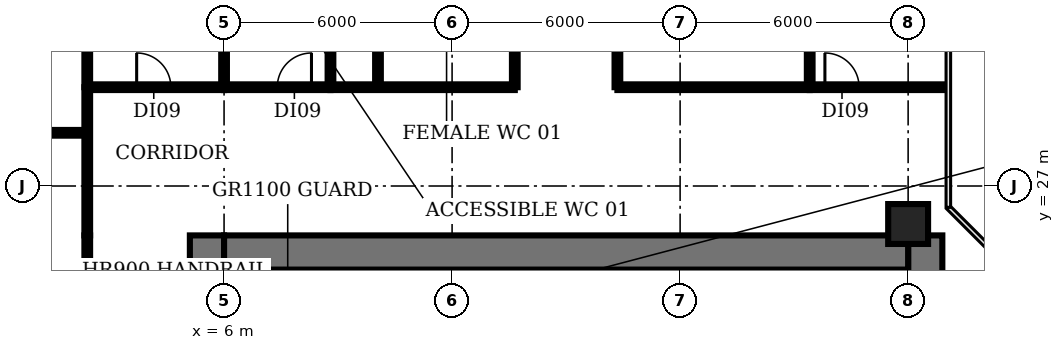
"""IFC4 building model, lengths in metres.
Left out: names, types, materials, properties, quantities, classifications, styles, units other than length and angle.
Written with IfcOpenShell. Run it as: python <this file> out.ifc"""

import sys

from ifc_helpers import new_model, si_unit, direction, frame, frame_2d, origin, origin_2d, place, context, subcontext, project, spatial, rectangle, circle, extrude, element, fill, save


model = new_model("IFC4")
c1 = context("Model", 3, precision=1e-05, world=origin(), true_north=direction((0.0, 1.0)))
c2 = subcontext(c1, "Body", "Model", "MODEL_VIEW")
j1 = project(units=[si_unit("LENGTHUNIT", "METRE"), si_unit("PLANEANGLEUNIT", "RADIAN")], contexts=[c1])
p1 = place(None, origin())
s1 = spatial("IfcSite", under=j1, at=p1, CompositionType="ELEMENT")
p2 = place(p1, origin())
s2 = spatial("IfcBuilding", under=s1, at=p2, CompositionType="ELEMENT")
p3 = place(p2, frame((0.0, 0.0, 71.0)))
s3 = spatial("IfcBuildingStorey", under=s2, at=p3, CompositionType="ELEMENT", Elevation=71.0)
p4 = place(p3, frame((24.0, 26.0, 0.0), z_axis=(0.0, 0.0, 1.0), x_axis=(1.0, 0.0, 0.0)))
e1 = element("IfcColumn", 1, at=p4, inside=s3, PredefinedType="COLUMN", context=c2, shape_type="SweptSolid", body=[
    extrude(circle(Radius=0.525, at=origin_2d()), origin(), (0.0, 0.0, 1.0), 3.85),
])
p5 = place(p3, frame((9.275, 18.375, 0.0), z_axis=(0.0, 0.0, 1.0), x_axis=(0.0, 1.0, 0.0)))
e2 = element("IfcWall", 2, at=p5, inside=s3, PredefinedType="SHEAR", context=c2, shape_type="SweptSolid", body=[
    extrude(rectangle(XDim=6.425, YDim=0.25, at=frame_2d((3.212, 0.0))), origin(), (0.0, 0.0, 1.0), 3.85),
])
for number, where, z_axis, x_axis in (
    (3, (15.1, 22.9, 0.0), (0.0, 0.0, 1.0), (0.0, 1.0, 0.0)),
    (4, (20.7, 22.9, 0.0), (0.0, 0.0, 1.0), (0.0, 1.0, 0.0)),
):
    element("IfcWall", number, at=place(p3, frame(where, z_axis=z_axis, x_axis=x_axis)), inside=s3, PredefinedType="SHEAR", context=c2, shape_type="SweptSolid", body=[
        extrude(rectangle(XDim=1.9, YDim=0.2, at=frame_2d((0.95, 0.0))), origin(), (0.0, 0.0, 1.0), 3.85),
    ])
p6 = place(p3, frame((5.55, 4.5, 0.0), z_axis=(0.0, 0.0, 1.0), x_axis=(0.0, 1.0, 0.0)))
e5 = element("IfcWall", 5, at=p6, inside=s3, PredefinedType="SHEAR", context=c2, shape_type="SweptSolid", body=[
    extrude(rectangle(XDim=21.2, YDim=0.9, at=frame_2d((10.6, 0.0))), origin(), (0.0, 0.0, 1.0), 3.85),
])
p7 = place(p6, frame((1.15, 0.0, 0.0)))
e6 = element("IfcOpeningElement", 6, at=p7, cuts=e5, PredefinedType="OPENING", context=c2, shape_type="SweptSolid", body=[
    extrude(rectangle(XDim=1.5, YDim=2.1, at=frame_2d((0.75, 1.05))), frame((0.0, 0.46, 0.0), z_axis=(0.0, -1.0, 0.0), x_axis=(1.0, 0.0, 0.0)), (0.0, 0.0, 1.0), 0.92),
])
p8 = place(p6, frame((7.6, 0.0, 0.0)))
e7 = element("IfcOpeningElement", 7, at=p8, cuts=e5, PredefinedType="OPENING", context=c2, shape_type="SweptSolid", body=[
    extrude(rectangle(XDim=1.2, YDim=2.1, at=frame_2d((0.6, 1.05))), frame((0.0, 0.46, 0.0), z_axis=(0.0, -1.0, 0.0), x_axis=(1.0, 0.0, 0.0)), (0.0, 0.0, 1.0), 0.92),
])
p9 = place(p6, frame((14.15, 0.0, 0.0)))
e8 = element("IfcOpeningElement", 8, at=p9, cuts=e5, PredefinedType="OPENING", context=c2, shape_type="SweptSolid", body=[
    extrude(rectangle(XDim=1.2, YDim=2.1, at=frame_2d((0.6, 1.05))), frame((0.0, 0.46, 0.0), z_axis=(0.0, -1.0, 0.0), x_axis=(1.0, 0.0, 0.0)), (0.0, 0.0, 1.0), 0.92),
])
p10 = place(p3, frame((24.45, 25.7, 0.0), z_axis=(0.0, 0.0, 1.0), x_axis=(0.0, -1.0, 0.0)))
e9 = element("IfcWall", 9, at=p10, inside=s3, PredefinedType="SHEAR", context=c2, shape_type="SweptSolid", body=[
    extrude(rectangle(XDim=21.2, YDim=0.9, at=frame_2d((10.6, 0.0))), origin(), (0.0, 0.0, 1.0), 3.85),
])
p11 = place(p10, frame((18.55, 0.0, 0.0)))
e10 = element("IfcOpeningElement", 10, at=p11, cuts=e9, PredefinedType="OPENING", context=c2, shape_type="SweptSolid", body=[
    extrude(rectangle(XDim=1.5, YDim=2.1, at=frame_2d((0.75, 1.05))), frame((0.0, 0.46, 0.0), z_axis=(0.0, -1.0, 0.0), x_axis=(1.0, 0.0, 0.0)), (0.0, 0.0, 1.0), 0.92),
])
p12 = place(p10, frame((12.45, 0.0, 0.0)))
e11 = element("IfcOpeningElement", 11, at=p12, cuts=e9, PredefinedType="OPENING", context=c2, shape_type="SweptSolid", body=[
    extrude(rectangle(XDim=0.9, YDim=2.1, at=frame_2d((0.45, 1.05))), frame((0.0, 0.46, 0.0), z_axis=(0.0, -1.0, 0.0), x_axis=(1.0, 0.0, 0.0)), (0.0, 0.0, 1.0), 0.92),
])
p13 = place(p10, frame((6.45, 0.0, 0.0)))
e12 = element("IfcOpeningElement", 12, at=p13, cuts=e9, PredefinedType="OPENING", context=c2, shape_type="SweptSolid", body=[
    extrude(rectangle(XDim=2.0, YDim=2.1, at=frame_2d((1.0, 1.05))), frame((0.0, 0.46, 0.0), z_axis=(0.0, -1.0, 0.0), x_axis=(1.0, 0.0, 0.0)), (0.0, 0.0, 1.0), 0.92),
])
p14 = place(p3, frame((6.0, 25.25, 0.0), z_axis=(0.0, 0.0, 1.0), x_axis=(1.0, 0.0, 0.0)))
e13 = element("IfcWall", 13, at=p14, inside=s3, PredefinedType="SHEAR", context=c2, shape_type="SweptSolid", body=[
    extrude(rectangle(XDim=18.0, YDim=0.9, at=frame_2d((9.0, 0.0))), origin(), (0.0, 0.0, 1.0), 3.85),
])
p15 = place(p3, frame((-1.42, 28.4, 0.0), z_axis=(0.0, 0.0, 1.0), x_axis=(1.0, 0.0, 0.0)))
e14 = element("IfcWall", 14, at=p15, inside=s3, PredefinedType="PARTITIONING", context=c2, shape_type="SweptSolid", body=[
    extrude(rectangle(XDim=3.82, YDim=0.15, at=frame_2d((1.91, 0.0))), origin(), (0.0, 0.0, 1.0), 2.83),
])
p16 = place(p3, frame((2.4, 4.5, 0.0), z_axis=(0.0, 0.0, 1.0), x_axis=(0.0, 1.0, 0.0)))
e15 = element("IfcWall", 15, at=p16, inside=s3, PredefinedType="PARTITIONING", context=c2, shape_type="SweptSolid", body=[
    extrude(rectangle(XDim=21.2, YDim=0.15, at=frame_2d((10.6, 0.0))), origin(), (0.0, 0.0, 1.0), 2.83),
])
p17 = place(p16, frame((10.8, 0.0, 0.0)))
e16 = element("IfcOpeningElement", 16, at=p17, cuts=e15, PredefinedType="OPENING", context=c2, shape_type="SweptSolid", body=[
    extrude(rectangle(XDim=1.2, YDim=2.1, at=frame_2d((0.6, 1.05))), frame((0.0, 0.085, 0.0), z_axis=(0.0, -1.0, 0.0), x_axis=(1.0, 0.0, 0.0)), (0.0, 0.0, 1.0), 0.17),
])
p18 = place(p3, frame((2.4, 25.7, 0.0), z_axis=(0.0, 0.0, 1.0), x_axis=(0.0, 1.0, 0.0)))
e17 = element("IfcWall", 17, at=p18, inside=s3, PredefinedType="PARTITIONING", context=c2, shape_type="SweptSolid", body=[
    extrude(rectangle(XDim=3.9, YDim=0.15, at=frame_2d((1.95, 0.0))), origin(), (0.0, 0.0, 1.0), 2.83),
])
p19 = place(p3, frame((2.4, 29.6, 0.0), z_axis=(0.0, 0.0, 1.0), x_axis=(0.0, 1.0, 0.0)))
e18 = element("IfcWall", 18, at=p19, inside=s3, PredefinedType="PARTITIONING", context=c2, shape_type="SweptSolid", body=[
    extrude(rectangle(XDim=4.8, YDim=0.15, at=frame_2d((2.4, 0.0))), origin(), (0.0, 0.0, 1.0), 2.83),
])
p20 = place(p3, frame((2.4, 29.6, 0.0), z_axis=(0.0, 0.0, 1.0), x_axis=(1.0, 0.0, 0.0)))
e19 = element("IfcWall", 19, at=p20, inside=s3, PredefinedType="PARTITIONING", context=c2, shape_type="SweptSolid", body=[
    extrude(rectangle(XDim=3.6, YDim=0.15, at=frame_2d((1.8, 0.0))), origin(), (0.0, 0.0, 1.0), 2.83),
])
p21 = place(p20, frame((1.3, 0.0, 0.0)))
e20 = element("IfcOpeningElement", 20, at=p21, cuts=e19, PredefinedType="OPENING", context=c2, shape_type="SweptSolid", body=[
    extrude(rectangle(XDim=0.9, YDim=2.1, at=frame_2d((0.45, 1.05))), frame((0.0, 0.085, 0.0), z_axis=(0.0, -1.0, 0.0), x_axis=(1.0, 0.0, 0.0)), (0.0, 0.0, 1.0), 0.17),
])
p22 = place(p3, frame((6.0, 29.6, 0.0), z_axis=(0.0, 0.0, 1.0), x_axis=(0.0, 1.0, 0.0)))
e21 = element("IfcWall", 21, at=p22, inside=s3, PredefinedType="PARTITIONING", context=c2, shape_type="SweptSolid", body=[
    extrude(rectangle(XDim=4.8, YDim=0.15, at=frame_2d((2.4, 0.0))), origin(), (0.0, 0.0, 1.0), 2.83),
])
p23 = place(p3, frame((6.0, 29.6, 0.0), z_axis=(0.0, 0.0, 1.0), x_axis=(1.0, 0.0, 0.0)))
e22 = element("IfcWall", 22, at=p23, inside=s3, PredefinedType="PARTITIONING", context=c2, shape_type="SweptSolid", body=[
    extrude(rectangle(XDim=2.8, YDim=0.15, at=frame_2d((1.4, 0.0))), origin(), (0.0, 0.0, 1.0), 2.83),
])
p24 = place(p23, frame((1.4, 0.0, 0.0)))
e23 = element("IfcOpeningElement", 23, at=p24, cuts=e22, PredefinedType="OPENING", context=c2, shape_type="SweptSolid", body=[
    extrude(rectangle(XDim=0.9, YDim=2.1, at=frame_2d((0.45, 1.05))), frame((0.0, 0.085, 0.0), z_axis=(0.0, -1.0, 0.0), x_axis=(1.0, 0.0, 0.0)), (0.0, 0.0, 1.0), 0.17),
])
p25 = place(p3, frame((8.8, 29.6, 0.0), z_axis=(0.0, 0.0, 1.0), x_axis=(0.0, 1.0, 0.0)))
e24 = element("IfcWall", 24, at=p25, inside=s3, PredefinedType="PARTITIONING", context=c2, shape_type="SweptSolid", body=[
    extrude(rectangle(XDim=4.8, YDim=0.15, at=frame_2d((2.4, 0.0))), origin(), (0.0, 0.0, 1.0), 2.83),
])
p26 = place(p3, frame((8.8, 29.6, 0.0), z_axis=(0.0, 0.0, 1.0), x_axis=(1.0, 0.0, 0.0)))
e25 = element("IfcWall", 25, at=p26, inside=s3, PredefinedType="PARTITIONING", context=c2, shape_type="SweptSolid", body=[
    extrude(rectangle(XDim=4.85, YDim=0.15, at=frame_2d((2.425, 0.0))), origin(), (0.0, 0.0, 1.0), 2.83),
])
p27 = place(p3, frame((10.05, 29.6, 0.0), z_axis=(0.0, 0.0, 1.0), x_axis=(0.0, 1.0, 0.0)))
e26 = element("IfcWall", 26, at=p27, inside=s3, PredefinedType="PARTITIONING", context=c2, shape_type="SweptSolid", body=[
    extrude(rectangle(XDim=4.8, YDim=0.15, at=frame_2d((2.4, 0.0))), origin(), (0.0, 0.0, 1.0), 2.83),
])
p28 = place(p3, frame((13.65, 29.6, 0.0), z_axis=(0.0, 0.0, 1.0), x_axis=(0.0, 1.0, 0.0)))
e27 = element("IfcWall", 27, at=p28, inside=s3, PredefinedType="PARTITIONING", context=c2, shape_type="SweptSolid", body=[
    extrude(rectangle(XDim=4.8, YDim=0.15, at=frame_2d((2.4, 0.0))), origin(), (0.0, 0.0, 1.0), 2.83),
])
p29 = place(p28, frame((1.9, 0.0, 0.0)))
e28 = element("IfcOpeningElement", 28, at=p29, cuts=e27, PredefinedType="OPENING", context=c2, shape_type="SweptSolid", body=[
    extrude(rectangle(XDim=0.9, YDim=2.1, at=frame_2d((0.45, 1.05))), frame((0.0, 0.085, 0.0), z_axis=(0.0, -1.0, 0.0), x_axis=(1.0, 0.0, 0.0)), (0.0, 0.0, 1.0), 0.17),
])
p30 = place(p3, frame((16.35, 29.6, 0.0), z_axis=(0.0, 0.0, 1.0), x_axis=(0.0, 1.0, 0.0)))
e29 = element("IfcWall", 29, at=p30, inside=s3, PredefinedType="PARTITIONING", context=c2, shape_type="SweptSolid", body=[
    extrude(rectangle(XDim=4.8, YDim=0.15, at=frame_2d((2.4, 0.0))), origin(), (0.0, 0.0, 1.0), 2.83),
])
p31 = place(p3, frame((16.35, 29.6, 0.0), z_axis=(0.0, 0.0, 1.0), x_axis=(1.0, 0.0, 0.0)))
e30 = element("IfcWall", 30, at=p31, inside=s3, PredefinedType="PARTITIONING", context=c2, shape_type="SweptSolid", body=[
    extrude(rectangle(XDim=5.06, YDim=0.15, at=frame_2d((2.53, 0.0))), origin(), (0.0, 0.0, 1.0), 2.83),
])
p32 = place(p3, frame((21.41, 29.6, 0.0), z_axis=(0.0, 0.0, 1.0), x_axis=(0.0, 1.0, 0.0)))
e31 = element("IfcWall", 31, at=p32, inside=s3, PredefinedType="PARTITIONING", context=c2, shape_type="SweptSolid", body=[
    extrude(rectangle(XDim=4.8, YDim=0.15, at=frame_2d((2.4, 0.0))), origin(), (0.0, 0.0, 1.0), 2.83),
])
p33 = place(p3, frame((21.41, 29.6, 0.0), z_axis=(0.0, 0.0, 1.0), x_axis=(1.0, 0.0, 0.0)))
e32 = element("IfcWall", 32, at=p33, inside=s3, PredefinedType="PARTITIONING", context=c2, shape_type="SweptSolid", body=[
    extrude(rectangle(XDim=3.6, YDim=0.15, at=frame_2d((1.8, 0.0))), origin(), (0.0, 0.0, 1.0), 2.83),
])
p34 = place(p33, frame((0.4, 0.0, 0.0)))
e33 = element("IfcOpeningElement", 33, at=p34, cuts=e32, PredefinedType="OPENING", context=c2, shape_type="SweptSolid", body=[
    extrude(rectangle(XDim=0.9, YDim=2.1, at=frame_2d((0.45, 1.05))), frame((0.0, 0.085, 0.0), z_axis=(0.0, -1.0, 0.0), x_axis=(1.0, 0.0, 0.0)), (0.0, 0.0, 1.0), 0.17),
])
p35 = place(p21, origin())
e34 = element("IfcDoor", 34, at=p35, inside=s3, OperationType="SINGLE_SWING_LEFT", PredefinedType="DOOR", context=c2, shape_type="SweptSolid", body=[
    extrude(rectangle(XDim=0.9, YDim=2.1, at=frame_2d((0.45, 1.05))), frame((0.0, 0.025, 0.0), z_axis=(0.0, -1.0, 0.0), x_axis=(1.0, 0.0, 0.0)), (0.0, 0.0, 1.0), 0.05),
])
fill(e20, e34)
p36 = place(p24, origin())
e35 = element("IfcDoor", 35, at=p36, inside=s3, OperationType="SINGLE_SWING_RIGHT", PredefinedType="DOOR", context=c2, shape_type="SweptSolid", body=[
    extrude(rectangle(XDim=0.9, YDim=2.1, at=frame_2d((0.45, 1.05))), frame((0.0, 0.025, 0.0), z_axis=(0.0, -1.0, 0.0), x_axis=(1.0, 0.0, 0.0)), (0.0, 0.0, 1.0), 0.05),
])
fill(e23, e35)
p37 = place(p34, origin())
e36 = element("IfcDoor", 36, at=p37, inside=s3, OperationType="SINGLE_SWING_LEFT", PredefinedType="DOOR", context=c2, shape_type="SweptSolid", body=[
    extrude(rectangle(XDim=0.9, YDim=2.1, at=frame_2d((0.45, 1.05))), frame((0.0, 0.025, 0.0), z_axis=(0.0, -1.0, 0.0), x_axis=(1.0, 0.0, 0.0)), (0.0, 0.0, 1.0), 0.05),
])
fill(e33, e36)
save(model, sys.argv[1])
